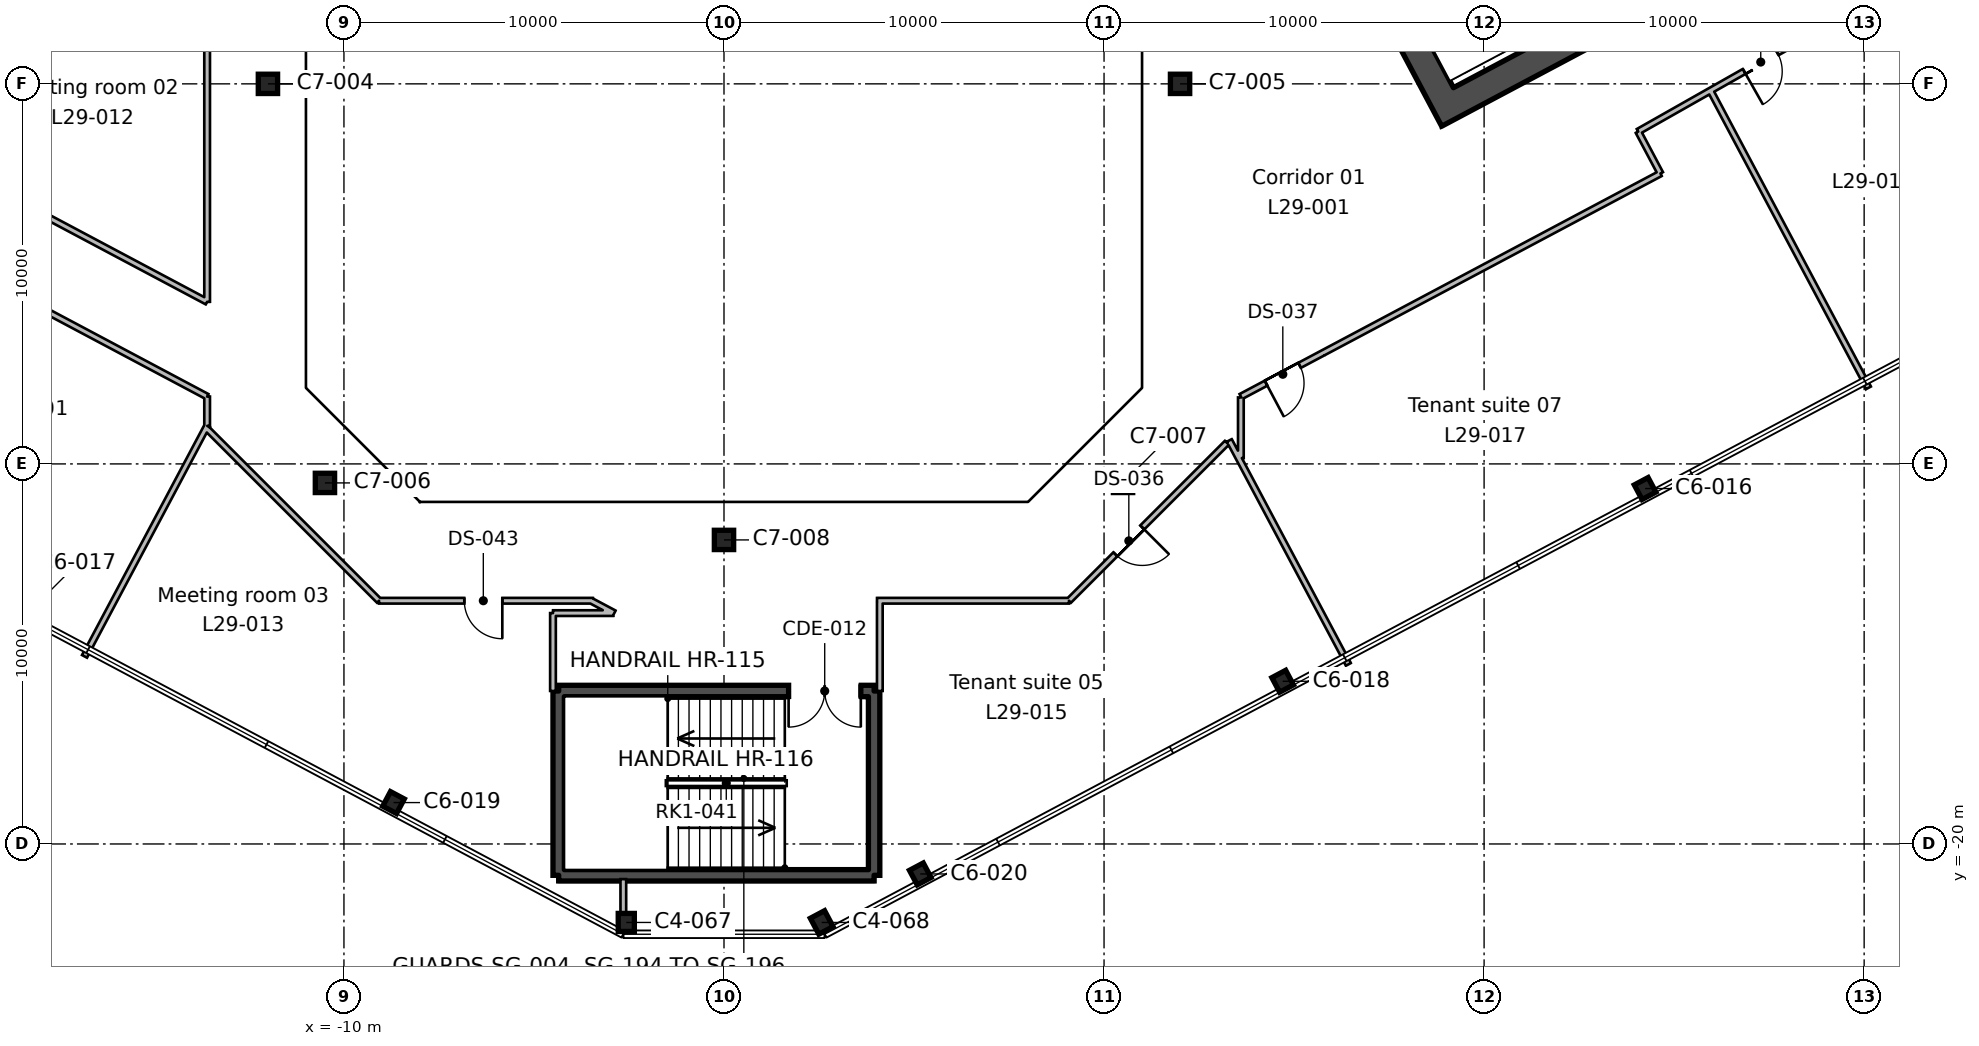
"""IFC4 building model, lengths in metres.
Left out: names, types, materials, properties, quantities, classifications, styles, units other than length and angle.
Written with IfcOpenShell. Run it as: python <this file> out.ifc"""

import sys

from ifc_helpers import new_model, si_unit, direction, frame, frame_2d, origin, origin_2d, place, context, subcontext, project, spatial, rectangle, hollow_rectangle, i_section, extrude, element, fill, save


model = new_model("IFC4")
c1 = context("Model", 3, precision=1e-05, world=origin(), true_north=direction((0.0, 1.0)))
c2 = subcontext(c1, "Body", "Model", "MODEL_VIEW")
j1 = project(units=[si_unit("LENGTHUNIT", "METRE"), si_unit("PLANEANGLEUNIT", "RADIAN")], contexts=[c1])
p1 = place(None, origin())
s1 = spatial("IfcSite", under=j1, at=p1, CompositionType="ELEMENT")
p2 = place(p1, origin())
s2 = spatial("IfcBuilding", under=s1, at=p2, CompositionType="ELEMENT")
p3 = place(p2, frame((0.0, 0.0, 142.2)))
s3 = spatial("IfcBuildingStorey", under=s2, at=p3, CompositionType="ELEMENT", Elevation=142.2)
for number, where, z_axis, x_axis in (
    (1, (-2.571, -22.065, 0.0), (0.0, 0.0, 1.0), (1.0, 0.0, 0.0)),
    (2, (2.571, -22.065, 0.0), (0.0, 0.0, 1.0), (0.883, 0.469, 0.0)),
):
    element("IfcColumn", number, at=place(p3, frame(where, z_axis=z_axis, x_axis=x_axis)), inside=s3, PredefinedType="COLUMN", context=c2, shape_type="SweptSolid", body=[
        extrude(i_section(OverallWidth=0.424, OverallDepth=0.475, WebThickness=0.048, FlangeThickness=0.077, FilletRadius=0.015, at=origin_2d()), origin(), (0.0, 0.0, 1.0), 4.0),
    ])
for number, where, z_axis, x_axis in (
    (3, (5.164, -20.789, 0.0), (0.0, 0.0, 1.0), (0.883, 0.469, 0.0)),
    (4, (-8.696, -18.911, 0.0), (0.0, 0.0, 1.0), (0.883, -0.469, 0.0)),
    (5, (14.7, -15.719, 0.0), (0.0, 0.0, 1.0), (0.883, 0.469, 0.0)),
):
    element("IfcColumn", number, at=place(p3, frame(where, z_axis=z_axis, x_axis=x_axis)), inside=s3, PredefinedType="COLUMN", context=c2, shape_type="SweptSolid", body=[
        extrude(i_section(OverallWidth=0.412, OverallDepth=0.434, WebThickness=0.036, FlangeThickness=0.057, FilletRadius=0.015, at=origin_2d()), origin(), (0.0, 0.0, 1.0), 4.0),
    ])
p4 = place(p3, frame((0.0, -12.0, 0.0), z_axis=(0.0, 0.0, 1.0), x_axis=(1.0, 0.0, 0.0)))
e6 = element("IfcColumn", 6, at=p4, inside=s3, PredefinedType="COLUMN", context=c2, shape_type="SweptSolid", body=[
    extrude(hollow_rectangle(XDim=0.508, YDim=0.508, WallThickness=0.012, InnerFilletRadius=0.006, OuterFilletRadius=0.018, at=origin_2d()), origin(), (0.0, 0.0, 1.0), 4.0),
])
p5 = place(p3, frame((24.236, -10.648, 0.0), z_axis=(0.0, 0.0, 1.0), x_axis=(0.882947592859, 0.469471562786, 0.0)))
e7 = element("IfcColumn", 7, at=p5, inside=s3, PredefinedType="COLUMN", context=c2, shape_type="SweptSolid", body=[
    extrude(i_section(OverallWidth=0.412, OverallDepth=0.434, WebThickness=0.036, FlangeThickness=0.057, FilletRadius=0.015, at=origin_2d()), origin(), (0.0, 0.0, 1.0), 4.0),
])
for number, where, z_axis, x_axis in (
    (8, (-10.5, -10.5, 0.0), (0.0, 0.0, 1.0), (1.0, 0.0, 0.0)),
    (9, (10.5, -10.5, 0.0), (0.0, 0.0, 1.0), (1.0, 0.0, 0.0)),
    (10, (-12.0, 0.0, 0.0), (0.0, 0.0, 1.0), (1.0, 0.0, 0.0)),
    (11, (12.0, 0.0, 0.0), (0.0, 0.0, 1.0), (1.0, 0.0, 0.0)),
):
    element("IfcColumn", number, at=place(p3, frame(where, z_axis=z_axis, x_axis=x_axis)), inside=s3, PredefinedType="COLUMN", context=c2, shape_type="SweptSolid", body=[
        extrude(hollow_rectangle(XDim=0.508, YDim=0.508, WallThickness=0.012, InnerFilletRadius=0.006, OuterFilletRadius=0.018, at=origin_2d()), origin(), (0.0, 0.0, 1.0), 4.0),
    ])
p6 = place(p3, frame((-13.498, 18.333, 0.0), z_axis=(0.0, 0.0, 1.0), x_axis=(-0.469469918705, -0.88294846703, 0.0)))
e12 = element("IfcWall", 12, at=p6, inside=s3, PredefinedType="SHEAR", context=c2, shape_type="SweptSolid", body=[
    extrude(rectangle(XDim=19.7, YDim=0.75, at=frame_2d((9.85, 0.0))), origin(), (0.0, 0.0, 1.0), 4.0),
])
p7 = place(p6, frame((6.85, 0.0, 0.0)))
e13 = element("IfcOpeningElement", 13, at=p7, cuts=e12, PredefinedType="OPENING", context=c2, shape_type="SweptSolid", body=[
    extrude(rectangle(XDim=2.4, YDim=2.4, at=frame_2d((1.2, 1.2))), frame((0.0, 0.385, 0.0), z_axis=(0.0, -1.0, 0.0), x_axis=(1.0, 0.0, 0.0)), (0.0, 0.0, 1.0), 0.77),
])
p8 = place(p3, frame((19.215, -0.939, 0.0), z_axis=(0.0, 0.0, 1.0), x_axis=(-0.469479580143, 0.882943329908, 0.0)))
e14 = element("IfcWall", 14, at=p8, inside=s3, PredefinedType="SHEAR", context=c2, shape_type="SweptSolid", body=[
    extrude(rectangle(XDim=19.7, YDim=0.75, at=frame_2d((9.85, 0.0))), origin(), (0.0, 0.0, 1.0), 4.0),
])
p9 = place(p8, frame((6.85, 0.0, 0.0)))
e15 = element("IfcOpeningElement", 15, at=p9, cuts=e14, PredefinedType="OPENING", context=c2, shape_type="SweptSolid", body=[
    extrude(rectangle(XDim=2.4, YDim=2.4, at=frame_2d((1.2, 1.2))), frame((0.0, 0.385, 0.0), z_axis=(0.0, -1.0, 0.0), x_axis=(1.0, 0.0, 0.0)), (0.0, 0.0, 1.0), 0.77),
])
p10 = place(p3, frame((19.37, -0.432, 0.0), z_axis=(0.0, 0.0, 1.0), x_axis=(0.88294509198, 0.469476266226, 0.0)))
e16 = element("IfcWall", 16, at=p10, inside=s3, PredefinedType="SHEAR", context=c2, shape_type="SweptSolid", body=[
    extrude(rectangle(XDim=20.2, YDim=0.75, at=frame_2d((10.1, 0.0))), origin(), (0.0, 0.0, 1.0), 4.0),
])
p11 = place(p3, frame((3.95, -15.975, 0.0), z_axis=(0.0, 0.0, 1.0), x_axis=(0.0, -1.0, 0.0)))
e17 = element("IfcWall", 17, at=p11, inside=s3, PredefinedType="SHEAR", context=c2, shape_type="SweptSolid", body=[
    extrude(rectangle(XDim=4.85, YDim=0.3, at=frame_2d((2.425, 0.0))), origin(), (0.0, 0.0, 1.0), 4.0),
])
p12 = place(p3, frame((3.95, -20.825, 0.0), z_axis=(0.0, 0.0, 1.0), x_axis=(-1.0, 0.0, 0.0)))
e18 = element("IfcWall", 18, at=p12, inside=s3, PredefinedType="SHEAR", context=c2, shape_type="SweptSolid", body=[
    extrude(rectangle(XDim=8.3, YDim=0.3, at=frame_2d((4.15, 0.0))), origin(), (0.0, 0.0, 1.0), 4.0),
])
p13 = place(p3, frame((-4.35, -20.825, 0.0), z_axis=(0.0, 0.0, 1.0), x_axis=(0.0, 1.0, 0.0)))
e19 = element("IfcWall", 19, at=p13, inside=s3, PredefinedType="SHEAR", context=c2, shape_type="SweptSolid", body=[
    extrude(rectangle(XDim=4.85, YDim=0.3, at=frame_2d((2.425, 0.0))), origin(), (0.0, 0.0, 1.0), 4.0),
])
p14 = place(p3, frame((-4.35, -15.975, 0.0), z_axis=(0.0, 0.0, 1.0), x_axis=(1.0, 0.0, 0.0)))
e20 = element("IfcWall", 20, at=p14, inside=s3, PredefinedType="SHEAR", context=c2, shape_type="SweptSolid", body=[
    extrude(rectangle(XDim=8.3, YDim=0.3, at=frame_2d((4.15, 0.0))), origin(), (0.0, 0.0, 1.0), 4.0),
])
p15 = place(p14, frame((6.05, 0.0, 0.0)))
e21 = element("IfcOpeningElement", 21, at=p15, cuts=e20, PredefinedType="OPENING", context=c2, shape_type="SweptSolid", body=[
    extrude(rectangle(XDim=1.9, YDim=2.1, at=frame_2d((0.95, 1.05))), frame((0.0, 0.16, 0.0), z_axis=(0.0, -1.0, 0.0), x_axis=(1.0, 0.0, 0.0)), (0.0, 0.0, 1.0), 0.32),
])
p16 = place(p3, frame((-13.6, -8.228, 0.0), z_axis=(0.0, 0.0, 1.0), x_axis=(-0.882954510497, 0.469458552369, 0.0)))
e22 = element("IfcWall", 22, at=p16, inside=s3, PredefinedType="PARTITIONING", context=c2, shape_type="SweptSolid", body=[
    extrude(rectangle(XDim=34.953, YDim=0.15, at=frame_2d((17.477, 0.0))), origin(), (0.0, 0.0, 1.0), 3.64),
])
p17 = place(p16, frame((26.45, 0.0, 0.0)))
e23 = element("IfcOpeningElement", 23, at=p17, cuts=e22, PredefinedType="OPENING", context=c2, shape_type="SweptSolid", body=[
    extrude(rectangle(XDim=1.0, YDim=2.1, at=frame_2d((0.5, 1.05))), frame((0.0, 0.085, 0.0), z_axis=(0.0, -1.0, 0.0), x_axis=(1.0, 0.0, 0.0)), (0.0, 0.0, 1.0), 0.17),
])
p18 = place(p16, frame((16.55, 0.0, 0.0)))
e24 = element("IfcOpeningElement", 24, at=p18, cuts=e22, PredefinedType="OPENING", context=c2, shape_type="SweptSolid", body=[
    extrude(rectangle(XDim=1.8, YDim=2.1, at=frame_2d((0.9, 1.05))), frame((0.0, 0.085, 0.0), z_axis=(0.0, -1.0, 0.0), x_axis=(1.0, 0.0, 0.0)), (0.0, 0.0, 1.0), 0.17),
])
p19 = place(p3, frame((-13.6, -8.228, 0.0), z_axis=(0.0, 0.0, 1.0), x_axis=(0.0, -1.0, 0.0)))
e25 = element("IfcWall", 25, at=p19, inside=s3, PredefinedType="PARTITIONING", context=c2, shape_type="SweptSolid", body=[
    extrude(rectangle(XDim=0.77, YDim=0.15, at=frame_2d((0.385, 0.0))), origin(), (0.0, 0.0, 1.0), 3.64),
])
p20 = place(p3, frame((-13.6, -8.998, 0.0), z_axis=(0.0, 0.0, 1.0), x_axis=(-0.469531053644, -0.882915958438, 0.0)))
e26 = element("IfcWall", 26, at=p20, inside=s3, PredefinedType="PARTITIONING", context=c2, shape_type="SweptSolid", body=[
    extrude(rectangle(XDim=6.87, YDim=0.15, at=frame_2d((3.435, 0.0))), origin(), (0.0, 0.0, 1.0), 3.64),
])
p21 = place(p3, frame((-3.447, -13.6, 0.0), z_axis=(0.0, 0.0, 1.0), x_axis=(-1.0, 0.0, 0.0)))
e27 = element("IfcWall", 27, at=p21, inside=s3, PredefinedType="PARTITIONING", context=c2, shape_type="SweptSolid", body=[
    extrude(rectangle(XDim=5.63, YDim=0.15, at=frame_2d((2.815, 0.0))), origin(), (0.0, 0.0, 1.0), 3.64),
])
p22 = place(p21, frame((2.386, 0.0, 0.0)))
e28 = element("IfcOpeningElement", 28, at=p22, cuts=e27, PredefinedType="OPENING", context=c2, shape_type="SweptSolid", body=[
    extrude(rectangle(XDim=1.0, YDim=2.1, at=frame_2d((0.5, 1.05))), frame((0.0, 0.085, 0.0), z_axis=(0.0, -1.0, 0.0), x_axis=(1.0, 0.0, 0.0)), (0.0, 0.0, 1.0), 0.17),
])
p23 = place(p3, frame((-9.077, -13.6, 0.0), z_axis=(0.0, 0.0, 1.0), x_axis=(-0.707106781187, 0.707106781187, 0.0)))
e29 = element("IfcWall", 29, at=p23, inside=s3, PredefinedType="PARTITIONING", context=c2, shape_type="SweptSolid", body=[
    extrude(rectangle(XDim=6.397, YDim=0.15, at=frame_2d((3.198, 0.0))), origin(), (0.0, 0.0, 1.0), 3.64),
])
p24 = place(p3, frame((-4.5, -15.975, 0.0), z_axis=(0.0, 0.0, 1.0), x_axis=(0.0, 1.0, 0.0)))
e30 = element("IfcWall", 30, at=p24, inside=s3, PredefinedType="PARTITIONING", context=c2, shape_type="SweptSolid", body=[
    extrude(rectangle(XDim=2.05, YDim=0.15, at=frame_2d((1.025, 0.0))), origin(), (0.0, 0.0, 1.0), 3.64),
])
p25 = place(p3, frame((-2.909, -13.925, 0.0), z_axis=(0.0, 0.0, 1.0), x_axis=(-0.999999811638, -0.000613779231, 0.0)))
e31 = element("IfcWall", 31, at=p25, inside=s3, PredefinedType="PARTITIONING", context=c2, shape_type="SweptSolid", body=[
    extrude(rectangle(XDim=1.591, YDim=0.15, at=frame_2d((0.795, 0.0))), origin(), (0.0, 0.0, 1.0), 3.64),
])
p26 = place(p3, frame((-2.886, -13.925, 0.0), z_axis=(0.0, 0.0, 1.0), x_axis=(-0.882928394432, 0.469507667994, 0.0)))
e32 = element("IfcWall", 32, at=p26, inside=s3, PredefinedType="PARTITIONING", context=c2, shape_type="SweptSolid", body=[
    extrude(rectangle(XDim=0.692, YDim=0.15, at=frame_2d((0.346, 0.0))), origin(), (0.0, 0.0, 1.0), 3.64),
])
p27 = place(p3, frame((-2.649, -20.925, 0.0), z_axis=(0.0, 0.0, 1.0), x_axis=(0.0, -1.0, 0.0)))
e33 = element("IfcWall", 33, at=p27, inside=s3, PredefinedType="PARTITIONING", context=c2, shape_type="SweptSolid", body=[
    extrude(rectangle(XDim=0.903, YDim=0.15, at=frame_2d((0.451, 0.0))), origin(), (0.0, 0.0, 1.0), 3.64),
])
p28 = place(p3, frame((13.233, -9.444, 0.0), z_axis=(0.0, 0.0, 1.0), x_axis=(-0.707106781187, -0.707106781187, 0.0)))
e34 = element("IfcWall", 34, at=p28, inside=s3, PredefinedType="PARTITIONING", context=c2, shape_type="SweptSolid", body=[
    extrude(rectangle(XDim=5.877, YDim=0.15, at=frame_2d((2.939, 0.0))), origin(), (0.0, 0.0, 1.0), 3.64),
])
p29 = place(p28, frame((3.15, 0.0, 0.0)))
e35 = element("IfcOpeningElement", 35, at=p29, cuts=e34, PredefinedType="OPENING", context=c2, shape_type="SweptSolid", body=[
    extrude(rectangle(XDim=1.0, YDim=2.1, at=frame_2d((0.5, 1.05))), frame((0.0, 0.085, 0.0), z_axis=(0.0, -1.0, 0.0), x_axis=(1.0, 0.0, 0.0)), (0.0, 0.0, 1.0), 0.17),
])
p30 = place(p3, frame((9.077, -13.6, 0.0), z_axis=(0.0, 0.0, 1.0), x_axis=(-1.0, 0.0, 0.0)))
e36 = element("IfcWall", 36, at=p30, inside=s3, PredefinedType="PARTITIONING", context=c2, shape_type="SweptSolid", body=[
    extrude(rectangle(XDim=5.051, YDim=0.15, at=frame_2d((2.525, 0.0))), origin(), (0.0, 0.0, 1.0), 3.64),
])
p31 = place(p3, frame((4.1, -15.975, 0.0), z_axis=(0.0, 0.0, 1.0), x_axis=(0.0, 1.0, 0.0)))
e37 = element("IfcWall", 37, at=p31, inside=s3, PredefinedType="PARTITIONING", context=c2, shape_type="SweptSolid", body=[
    extrude(rectangle(XDim=2.35, YDim=0.15, at=frame_2d((1.175, 0.0))), origin(), (0.0, 0.0, 1.0), 3.64),
])
p32 = place(p3, frame((13.295, -9.382, 0.0), z_axis=(0.0, 0.0, 1.0), x_axis=(0.469560801687, -0.882900137908, 0.0)))
e38 = element("IfcWall", 38, at=p32, inside=s3, PredefinedType="PARTITIONING", context=c2, shape_type="SweptSolid", body=[
    extrude(rectangle(XDim=6.674, YDim=0.15, at=frame_2d((3.337, 0.0))), origin(), (0.0, 0.0, 1.0), 3.64),
])
p33 = place(p3, frame((13.6, -8.251, 0.0), z_axis=(0.0, 0.0, 1.0), x_axis=(0.0, -1.0, 0.0)))
e39 = element("IfcWall", 39, at=p33, inside=s3, PredefinedType="PARTITIONING", context=c2, shape_type="SweptSolid", body=[
    extrude(rectangle(XDim=1.595, YDim=0.15, at=frame_2d((0.797, 0.0))), origin(), (0.0, 0.0, 1.0), 3.64),
])
p34 = place(p3, frame((13.6, -8.228, 0.0), z_axis=(0.0, 0.0, 1.0), x_axis=(0.882966268345, 0.46943643762, 0.0)))
e40 = element("IfcWall", 40, at=p34, inside=s3, PredefinedType="PARTITIONING", context=c2, shape_type="SweptSolid", body=[
    extrude(rectangle(XDim=2.454, YDim=0.15, at=frame_2d((1.227, 0.0))), origin(), (0.0, 0.0, 1.0), 3.64),
])
p35 = place(p34, frame((0.75, 0.0, 0.0)))
e41 = element("IfcOpeningElement", 41, at=p35, cuts=e40, PredefinedType="OPENING", context=c2, shape_type="SweptSolid", body=[
    extrude(rectangle(XDim=1.0, YDim=2.1, at=frame_2d((0.5, 1.05))), frame((0.0, 0.085, 0.0), z_axis=(0.0, -1.0, 0.0), x_axis=(1.0, 0.0, 0.0)), (0.0, 0.0, 1.0), 0.17),
])
p36 = place(p3, frame((24.055, -1.255, 0.0), z_axis=(0.0, 0.0, 1.0), x_axis=(0.469279071809, -0.883049915216, 0.0)))
e42 = element("IfcWall", 42, at=p36, inside=s3, PredefinedType="PARTITIONING", context=c2, shape_type="SweptSolid", body=[
    extrude(rectangle(XDim=1.249, YDim=0.15, at=frame_2d((0.625, 0.0))), origin(), (0.0, 0.0, 1.0), 3.64),
])
p37 = place(p3, frame((24.641, -2.358, 0.0), z_axis=(0.0, 0.0, 1.0), x_axis=(-0.882963445944, -0.469441746255, 0.0)))
e43 = element("IfcWall", 43, at=p37, inside=s3, PredefinedType="PARTITIONING", context=c2, shape_type="SweptSolid", body=[
    extrude(rectangle(XDim=10.05, YDim=0.15, at=frame_2d((5.025, 0.0))), origin(), (0.0, 0.0, 1.0), 3.64),
])
p38 = place(p3, frame((25.955, -0.177, 0.0), z_axis=(0.0, 0.0, 1.0), x_axis=(0.4693761959, -0.882998293726, 0.0)))
e44 = element("IfcWall", 44, at=p38, inside=s3, PredefinedType="PARTITIONING", context=c2, shape_type="SweptSolid", body=[
    extrude(rectangle(XDim=8.858, YDim=0.15, at=frame_2d((4.429, 0.0))), origin(), (0.0, 0.0, 1.0), 3.64),
])
p39 = place(p3, frame((30.542, 2.422, 0.0), z_axis=(0.0, 0.0, 1.0), x_axis=(-0.870052610738, -0.492958877136, 0.0)))
e45 = element("IfcWall", 45, at=p39, inside=s3, PredefinedType="PARTITIONING", context=c2, shape_type="SweptSolid", body=[
    extrude(rectangle(XDim=7.457, YDim=0.15, at=frame_2d((3.729, 0.0))), origin(), (0.0, 0.0, 1.0), 3.64),
])
p40 = place(p39, frame((3.25, 0.0, 0.0)))
e46 = element("IfcOpeningElement", 46, at=p40, cuts=e45, PredefinedType="OPENING", context=c2, shape_type="SweptSolid", body=[
    extrude(rectangle(XDim=1.0, YDim=2.1, at=frame_2d((0.5, 1.05))), frame((0.0, 0.085, 0.0), z_axis=(0.0, -1.0, 0.0), x_axis=(1.0, 0.0, 0.0)), (0.0, 0.0, 1.0), 0.17),
])
p41 = place(p3, frame((30.452, 2.371, 0.0), z_axis=(0.0, 0.0, 1.0), x_axis=(0.469442025079, -0.882963297703, 0.0)))
e47 = element("IfcWall", 47, at=p41, inside=s3, PredefinedType="PARTITIONING", context=c2, shape_type="SweptSolid", body=[
    extrude(rectangle(XDim=6.348, YDim=0.15, at=frame_2d((3.174, 0.0))), origin(), (0.0, 0.0, 1.0), 3.64),
])
p42 = place(p3, frame((-20.915, -1.847, 0.0), z_axis=(0.0, 0.0, 1.0), x_axis=(0.469483365134, 0.882941317338, 0.0)))
e48 = element("IfcWall", 48, at=p42, inside=s3, PredefinedType="PARTITIONING", context=c2, shape_type="SweptSolid", body=[
    extrude(rectangle(XDim=22.9, YDim=0.15, at=frame_2d((11.45, 0.0))), origin(), (0.0, 0.0, 1.0), 3.64),
])
p43 = place(p42, frame((10.95, 0.0, 0.0)))
e49 = element("IfcOpeningElement", 49, at=p43, cuts=e48, PredefinedType="OPENING", context=c2, shape_type="SweptSolid", body=[
    extrude(rectangle(XDim=1.0, YDim=2.1, at=frame_2d((0.5, 1.05))), frame((0.0, 0.085, 0.0), z_axis=(0.0, -1.0, 0.0), x_axis=(1.0, 0.0, 0.0)), (0.0, 0.0, 1.0), 0.17),
])
p44 = place(p3, frame((-13.6, 9.077, 0.0), z_axis=(0.0, 0.0, 1.0), x_axis=(0.0, -1.0, 0.0)))
e50 = element("IfcWall", 50, at=p44, inside=s3, PredefinedType="PARTITIONING", context=c2, shape_type="SweptSolid", body=[
    extrude(rectangle(XDim=14.814, YDim=0.15, at=frame_2d((7.407, 0.0))), origin(), (0.0, 0.0, 1.0), 3.64),
])
p45 = place(p3, frame((-13.6, -5.737, 0.0), z_axis=(0.0, 0.0, 1.0), x_axis=(-0.882911898193, 0.469538688533, 0.0)))
e51 = element("IfcWall", 51, at=p45, inside=s3, PredefinedType="PARTITIONING", context=c2, shape_type="SweptSolid", body=[
    extrude(rectangle(XDim=8.285, YDim=0.15, at=frame_2d((4.143, 0.0))), origin(), (0.0, 0.0, 1.0), 3.64),
])
p46 = place(p15, frame((1.9, 0.0, 0.0), z_axis=(0.0, 0.0, 1.0), x_axis=(-1.0, 0.0, 0.0)))
e52 = element("IfcDoor", 52, at=p46, inside=s3, OperationType="DOUBLE_DOOR_SINGLE_SWING", PredefinedType="DOOR", context=c2, shape_type="SweptSolid", body=[
    extrude(rectangle(XDim=1.9, YDim=2.1, at=frame_2d((0.95, 1.05))), frame((0.0, 0.025, 0.0), z_axis=(0.0, -1.0, 0.0), x_axis=(1.0, 0.0, 0.0)), (0.0, 0.0, 1.0), 0.05),
])
fill(e21, e52)
p47 = place(p29, origin())
e53 = element("IfcDoor", 53, at=p47, inside=s3, OperationType="SINGLE_SWING_LEFT", PredefinedType="DOOR", context=c2, shape_type="SweptSolid", body=[
    extrude(rectangle(XDim=1.0, YDim=2.1, at=frame_2d((0.5, 1.05))), frame((0.0, 0.025, 0.0), z_axis=(0.0, -1.0, 0.0), x_axis=(1.0, 0.0, 0.0)), (0.0, 0.0, 1.0), 0.05),
])
fill(e35, e53)
p48 = place(p35, frame((1.0, 0.0, 0.0), z_axis=(0.0, 0.0, 1.0), x_axis=(-1.0, 0.0, 0.0)))
e54 = element("IfcDoor", 54, at=p48, inside=s3, OperationType="SINGLE_SWING_RIGHT", PredefinedType="DOOR", context=c2, shape_type="SweptSolid", body=[
    extrude(rectangle(XDim=1.0, YDim=2.1, at=frame_2d((0.5, 1.05))), frame((0.0, 0.025, 0.0), z_axis=(0.0, -1.0, 0.0), x_axis=(1.0, 0.0, 0.0)), (0.0, 0.0, 1.0), 0.05),
])
fill(e41, e54)
p49 = place(p40, origin())
e55 = element("IfcDoor", 55, at=p49, inside=s3, OperationType="SINGLE_SWING_RIGHT", PredefinedType="DOOR", context=c2, shape_type="SweptSolid", body=[
    extrude(rectangle(XDim=1.0, YDim=2.1, at=frame_2d((0.5, 1.05))), frame((0.0, 0.025, 0.0), z_axis=(0.0, -1.0, 0.0), x_axis=(1.0, 0.0, 0.0)), (0.0, 0.0, 1.0), 0.05),
])
fill(e46, e55)
p50 = place(p22, origin())
e56 = element("IfcDoor", 56, at=p50, inside=s3, OperationType="SINGLE_SWING_LEFT", PredefinedType="DOOR", context=c2, shape_type="SweptSolid", body=[
    extrude(rectangle(XDim=1.0, YDim=2.1, at=frame_2d((0.5, 1.05))), frame((0.0, 0.025, 0.0), z_axis=(0.0, -1.0, 0.0), x_axis=(1.0, 0.0, 0.0)), (0.0, 0.0, 1.0), 0.05),
])
fill(e28, e56)
save(model, sys.argv[1])
